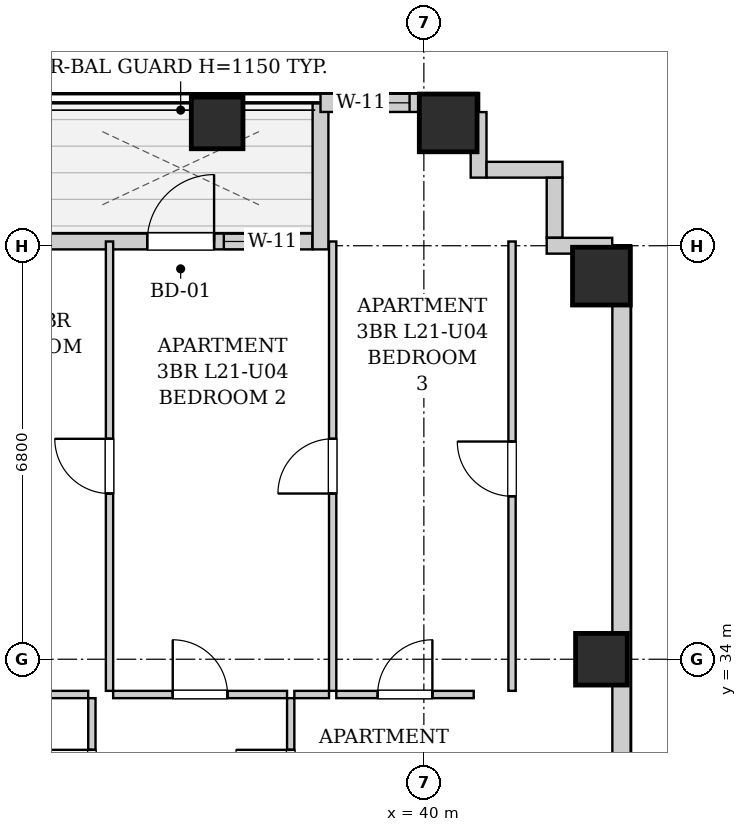
"""IFC4 building model, lengths in metres.
Left out: names, types, materials, properties, quantities, classifications, styles, units other than length and angle.
Written with IfcOpenShell. Run it as: python <this file> out.ifc"""

import sys

from ifc_helpers import new_model, si_unit, direction, frame, frame_2d, origin, origin_2d, place, context, subcontext, project, spatial, rectangle, extrude, element, fill, save


model = new_model("IFC4")
c1 = context("Model", 3, precision=1e-05, world=origin(), true_north=direction((0.0, 1.0)))
c2 = subcontext(c1, "Body", "Model", "MODEL_VIEW")
j1 = project(units=[si_unit("LENGTHUNIT", "METRE"), si_unit("PLANEANGLEUNIT", "RADIAN")], contexts=[c1])
p1 = place(None, origin())
s1 = spatial("IfcSite", under=j1, at=p1, CompositionType="ELEMENT")
p2 = place(p1, origin())
s2 = spatial("IfcBuilding", under=s1, at=p2, CompositionType="ELEMENT")
p3 = place(p2, frame((0.0, 0.0, 78.3)))
s3 = spatial("IfcBuildingStorey", under=s2, at=p3, CompositionType="ELEMENT", Elevation=78.3)
p4 = place(p3, frame((36.6, 42.82, 0.0), z_axis=(0.0, 0.0, 1.0), x_axis=(1.0, 0.0, 0.0)))
e1 = element("IfcColumn", 1, at=p4, inside=s3, PredefinedType="COLUMN", context=c2, shape_type="SweptSolid", body=[
    extrude(rectangle(XDim=0.85, YDim=0.85, at=origin_2d()), origin(), (0.0, 0.0, 1.0), 3.2),
])
p5 = place(p3, frame((40.4, 42.82, 0.0), z_axis=(0.0, 0.0, 1.0), x_axis=(1.0, 0.0, 0.0)))
e2 = element("IfcColumn", 2, at=p5, inside=s3, PredefinedType="COLUMN", context=c2, shape_type="SweptSolid", body=[
    extrude(rectangle(XDim=0.95, YDim=0.95, at=origin_2d()), origin(), (0.0, 0.0, 1.0), 3.2),
])
p6 = place(p3, frame((42.92, 34.0, 0.0), z_axis=(0.0, 0.0, 1.0), x_axis=(1.0, 0.0, 0.0)))
e3 = element("IfcColumn", 3, at=p6, inside=s3, PredefinedType="COLUMN", context=c2, shape_type="SweptSolid", body=[
    extrude(rectangle(XDim=0.85, YDim=0.85, at=origin_2d()), origin(), (0.0, 0.0, 1.0), 3.2),
])
p7 = place(p3, frame((42.92, 40.3, 0.0), z_axis=(0.0, 0.0, 1.0), x_axis=(1.0, 0.0, 0.0)))
e4 = element("IfcColumn", 4, at=p7, inside=s3, PredefinedType="COLUMN", context=c2, shape_type="SweptSolid", body=[
    extrude(rectangle(XDim=0.95, YDim=0.95, at=origin_2d()), origin(), (0.0, 0.0, 1.0), 3.2),
])
p8 = place(p3, frame((33.834, 40.87, 0.0), z_axis=(0.0, 0.0, 1.0), x_axis=(1.0, 0.0, 0.0)))
e5 = element("IfcWall", 5, at=p8, inside=s3, PredefinedType="SOLIDWALL", context=c2, shape_type="SweptSolid", body=[
    extrude(rectangle(XDim=4.332, YDim=0.26, at=frame_2d((2.166, 0.0))), origin(), (0.0, 0.0, 1.0), 2.94),
])
p9 = place(p8, frame((1.616, 0.0, 0.0)))
e6 = element("IfcOpeningElement", 6, at=p9, cuts=e5, PredefinedType="OPENING", context=c2, shape_type="SweptSolid", body=[
    extrude(rectangle(XDim=1.1, YDim=2.0, at=frame_2d((0.55, 1.0))), frame((0.0, 0.14, 0.0), z_axis=(0.0, -1.0, 0.0), x_axis=(1.0, 0.0, 0.0)), (0.0, 0.0, 1.0), 0.28),
])
p10 = place(p8, frame((2.876, 0.0, 0.55)))
e7 = element("IfcOpeningElement", 7, at=p10, cuts=e5, PredefinedType="OPENING", context=c2, shape_type="SweptSolid", body=[
    extrude(rectangle(XDim=0.85, YDim=1.2, at=frame_2d((0.425, 0.6))), frame((0.0, 0.14, 0.0), z_axis=(0.0, -1.0, 0.0), x_axis=(1.0, 0.0, 0.0)), (0.0, 0.0, 1.0), 0.28),
])
p11 = place(p3, frame((38.3, 40.74, 0.0), z_axis=(0.0, 0.0, 1.0), x_axis=(0.0, 1.0, 0.0)))
e8 = element("IfcWall", 8, at=p11, inside=s3, PredefinedType="SOLIDWALL", context=c2, shape_type="SweptSolid", body=[
    extrude(rectangle(XDim=2.4, YDim=0.26, at=frame_2d((1.2, 0.0))), origin(), (0.0, 0.0, 1.0), 2.94),
])
p12 = place(p3, frame((38.3, 43.15, 0.0), z_axis=(0.0, 0.0, 1.0), x_axis=(1.0, 0.0, 0.0)))
e9 = element("IfcWall", 9, at=p12, inside=s3, PredefinedType="SOLIDWALL", context=c2, shape_type="SweptSolid", body=[
    extrude(rectangle(XDim=2.6, YDim=0.3, at=frame_2d((1.3, 0.0))), origin(), (0.0, 0.0, 1.0), 2.94),
])
p13 = place(p12, frame((0.615, 0.0, 0.55)))
e10 = element("IfcOpeningElement", 10, at=p13, cuts=e9, PredefinedType="OPENING", context=c2, shape_type="SweptSolid", body=[
    extrude(rectangle(XDim=0.85, YDim=1.2, at=frame_2d((0.425, 0.6))), frame((0.0, 0.16, 0.0), z_axis=(0.0, -1.0, 0.0), x_axis=(1.0, 0.0, 0.0)), (0.0, 0.0, 1.0), 0.32),
])
p14 = place(p3, frame((43.25, 40.8, 0.0), z_axis=(0.0, 0.0, 1.0), x_axis=(0.0, -1.0, 0.0)))
e11 = element("IfcWall", 11, at=p14, inside=s3, PredefinedType="SOLIDWALL", context=c2, shape_type="SweptSolid", body=[
    extrude(rectangle(XDim=38.3, YDim=0.3, at=frame_2d((19.15, 0.0))), origin(), (0.0, 0.0, 1.0), 2.94),
])
p15 = place(p14, frame((33.495, 0.0, 0.55)))
e12 = element("IfcOpeningElement", 12, at=p15, cuts=e11, PredefinedType="OPENING", context=c2, shape_type="SweptSolid", body=[
    extrude(rectangle(XDim=1.35, YDim=1.2, at=frame_2d((0.675, 0.6))), frame((0.0, 0.16, 0.0), z_axis=(0.0, -1.0, 0.0), x_axis=(1.0, 0.0, 0.0)), (0.0, 0.0, 1.0), 0.32),
])
p16 = place(p14, frame((31.785, 0.0, 0.55)))
e13 = element("IfcOpeningElement", 13, at=p16, cuts=e11, PredefinedType="OPENING", context=c2, shape_type="SweptSolid", body=[
    extrude(rectangle(XDim=1.35, YDim=1.2, at=frame_2d((0.675, 0.6))), frame((0.0, 0.16, 0.0), z_axis=(0.0, -1.0, 0.0), x_axis=(1.0, 0.0, 0.0)), (0.0, 0.0, 1.0), 0.32),
])
p17 = place(p14, frame((21.93, 0.0, 0.55)))
e14 = element("IfcOpeningElement", 14, at=p17, cuts=e11, PredefinedType="OPENING", context=c2, shape_type="SweptSolid", body=[
    extrude(rectangle(XDim=1.35, YDim=1.2, at=frame_2d((0.675, 0.6))), frame((0.0, 0.16, 0.0), z_axis=(0.0, -1.0, 0.0), x_axis=(1.0, 0.0, 0.0)), (0.0, 0.0, 1.0), 0.32),
])
p18 = place(p14, frame((23.54, 0.0, 0.55)))
e15 = element("IfcOpeningElement", 15, at=p18, cuts=e11, PredefinedType="OPENING", context=c2, shape_type="SweptSolid", body=[
    extrude(rectangle(XDim=1.35, YDim=1.2, at=frame_2d((0.675, 0.6))), frame((0.0, 0.16, 0.0), z_axis=(0.0, -1.0, 0.0), x_axis=(1.0, 0.0, 0.0)), (0.0, 0.0, 1.0), 0.32),
])
p19 = place(p14, frame((14.95, 0.0, 0.55)))
e16 = element("IfcOpeningElement", 16, at=p19, cuts=e11, PredefinedType="OPENING", context=c2, shape_type="SweptSolid", body=[
    extrude(rectangle(XDim=1.35, YDim=1.2, at=frame_2d((0.675, 0.6))), frame((0.0, 0.16, 0.0), z_axis=(0.0, -1.0, 0.0), x_axis=(1.0, 0.0, 0.0)), (0.0, 0.0, 1.0), 0.32),
])
p20 = place(p14, frame((12.385, 0.0, 0.55)))
e17 = element("IfcOpeningElement", 17, at=p20, cuts=e11, PredefinedType="OPENING", context=c2, shape_type="SweptSolid", body=[
    extrude(rectangle(XDim=1.35, YDim=1.2, at=frame_2d((0.675, 0.6))), frame((0.0, 0.16, 0.0), z_axis=(0.0, -1.0, 0.0), x_axis=(1.0, 0.0, 0.0)), (0.0, 0.0, 1.0), 0.32),
])
p21 = place(p3, frame((40.9, 42.998, 0.0), z_axis=(0.0, 0.0, 1.0), x_axis=(0.0, -1.0, 0.0)))
e18 = element("IfcWall", 18, at=p21, inside=s3, PredefinedType="SOLIDWALL", context=c2, shape_type="SweptSolid", body=[
    extrude(rectangle(XDim=1.078, YDim=0.26, at=frame_2d((0.539, 0.0))), origin(), (0.0, 0.0, 1.0), 2.94),
])
p22 = place(p3, frame((41.032, 42.05, 0.0), z_axis=(0.0, 0.0, 1.0), x_axis=(1.0, 0.0, 0.0)))
e19 = element("IfcWall", 19, at=p22, inside=s3, PredefinedType="SOLIDWALL", context=c2, shape_type="SweptSolid", body=[
    extrude(rectangle(XDim=1.248, YDim=0.26, at=frame_2d((0.624, 0.0))), origin(), (0.0, 0.0, 1.0), 2.94),
])
p23 = place(p3, frame((42.15, 41.918, 0.0), z_axis=(0.0, 0.0, 1.0), x_axis=(0.0, -1.0, 0.0)))
e20 = element("IfcWall", 20, at=p23, inside=s3, PredefinedType="SOLIDWALL", context=c2, shape_type="SweptSolid", body=[
    extrude(rectangle(XDim=0.986, YDim=0.26, at=frame_2d((0.493, 0.0))), origin(), (0.0, 0.0, 1.0), 2.94),
])
p24 = place(p3, frame((42.02, 40.8, 0.0), z_axis=(0.0, 0.0, 1.0), x_axis=(1.0, 0.0, 0.0)))
e21 = element("IfcWall", 21, at=p24, inside=s3, PredefinedType="SOLIDWALL", context=c2, shape_type="SweptSolid", body=[
    extrude(rectangle(XDim=1.078, YDim=0.26, at=frame_2d((0.539, 0.0))), origin(), (0.0, 0.0, 1.0), 2.94),
])
p25 = place(p3, frame((34.54, 30.76, 0.0), z_axis=(0.0, 0.0, 1.0), x_axis=(0.0, 1.0, 0.0)))
e22 = element("IfcWall", 22, at=p25, inside=s3, PredefinedType="PARTITIONING", context=c2, shape_type="SweptSolid", body=[
    extrude(rectangle(XDim=2.6, YDim=0.12, at=frame_2d((1.3, 0.0))), origin(), (0.0, 0.0, 1.0), 2.94),
])
p26 = place(p25, frame((0.85, 0.0, 0.0)))
e23 = element("IfcOpeningElement", 23, at=p26, cuts=e22, PredefinedType="OPENING", context=c2, shape_type="SweptSolid", body=[
    extrude(rectangle(XDim=0.9, YDim=2.05, at=frame_2d((0.45, 1.025))), frame((0.0, 0.07, 0.0), z_axis=(0.0, -1.0, 0.0), x_axis=(1.0, 0.0, 0.0)), (0.0, 0.0, 1.0), 0.14),
])
p27 = place(p3, frame((30.88, 33.42, 0.0), z_axis=(0.0, 0.0, 1.0), x_axis=(1.0, 0.0, 0.0)))
e24 = element("IfcWall", 24, at=p27, inside=s3, PredefinedType="PARTITIONING", context=c2, shape_type="SweptSolid", body=[
    extrude(rectangle(XDim=3.6, YDim=0.12, at=frame_2d((1.8, 0.0))), origin(), (0.0, 0.0, 1.0), 2.94),
])
p28 = place(p27, frame((1.35, 0.0, 0.0)))
e25 = element("IfcOpeningElement", 25, at=p28, cuts=e24, PredefinedType="OPENING", context=c2, shape_type="SweptSolid", body=[
    extrude(rectangle(XDim=0.9, YDim=2.05, at=frame_2d((0.45, 1.025))), frame((0.0, 0.07, 0.0), z_axis=(0.0, -1.0, 0.0), x_axis=(1.0, 0.0, 0.0)), (0.0, 0.0, 1.0), 0.14),
])
p29 = place(p3, frame((37.81, 30.76, 0.0), z_axis=(0.0, 0.0, 1.0), x_axis=(0.0, 1.0, 0.0)))
e26 = element("IfcWall", 26, at=p29, inside=s3, PredefinedType="PARTITIONING", context=c2, shape_type="SweptSolid", body=[
    extrude(rectangle(XDim=2.6, YDim=0.12, at=frame_2d((1.3, 0.0))), origin(), (0.0, 0.0, 1.0), 2.94),
])
p30 = place(p29, frame((0.85, 0.0, 0.0)))
e27 = element("IfcOpeningElement", 27, at=p30, cuts=e26, PredefinedType="OPENING", context=c2, shape_type="SweptSolid", body=[
    extrude(rectangle(XDim=0.9, YDim=2.05, at=frame_2d((0.45, 1.025))), frame((0.0, 0.07, 0.0), z_axis=(0.0, -1.0, 0.0), x_axis=(1.0, 0.0, 0.0)), (0.0, 0.0, 1.0), 0.14),
])
p31 = place(p3, frame((34.89, 33.42, 0.0), z_axis=(0.0, 0.0, 1.0), x_axis=(1.0, 0.0, 0.0)))
e28 = element("IfcWall", 28, at=p31, inside=s3, PredefinedType="PARTITIONING", context=c2, shape_type="SweptSolid", body=[
    extrude(rectangle(XDim=2.86, YDim=0.12, at=frame_2d((1.43, 0.0))), origin(), (0.0, 0.0, 1.0), 2.94),
])
p32 = place(p31, frame((0.98, 0.0, 0.0)))
e29 = element("IfcOpeningElement", 29, at=p32, cuts=e28, PredefinedType="OPENING", context=c2, shape_type="SweptSolid", body=[
    extrude(rectangle(XDim=0.9, YDim=2.05, at=frame_2d((0.45, 1.025))), frame((0.0, 0.07, 0.0), z_axis=(0.0, -1.0, 0.0), x_axis=(1.0, 0.0, 0.0)), (0.0, 0.0, 1.0), 0.14),
])
p33 = place(p3, frame((37.87, 33.42, 0.0), z_axis=(0.0, 0.0, 1.0), x_axis=(1.0, 0.0, 0.0)))
e30 = element("IfcWall", 30, at=p33, inside=s3, PredefinedType="PARTITIONING", context=c2, shape_type="SweptSolid", body=[
    extrude(rectangle(XDim=0.57, YDim=0.12, at=frame_2d((0.285, 0.0))), origin(), (0.0, 0.0, 1.0), 2.94),
])
p34 = place(p3, frame((38.56, 33.42, 0.0), z_axis=(0.0, 0.0, 1.0), x_axis=(1.0, 0.0, 0.0)))
e31 = element("IfcWall", 31, at=p34, inside=s3, PredefinedType="PARTITIONING", context=c2, shape_type="SweptSolid", body=[
    extrude(rectangle(XDim=2.26, YDim=0.12, at=frame_2d((1.13, 0.0))), origin(), (0.0, 0.0, 1.0), 2.94),
])
p35 = place(p34, frame((0.68, 0.0, 0.0)))
e32 = element("IfcOpeningElement", 32, at=p35, cuts=e31, PredefinedType="OPENING", context=c2, shape_type="SweptSolid", body=[
    extrude(rectangle(XDim=0.9, YDim=2.05, at=frame_2d((0.45, 1.025))), frame((0.0, 0.07, 0.0), z_axis=(0.0, -1.0, 0.0), x_axis=(1.0, 0.0, 0.0)), (0.0, 0.0, 1.0), 0.14),
])
p36 = place(p3, frame((34.83, 33.48, 0.0), z_axis=(0.0, 0.0, 1.0), x_axis=(0.0, 1.0, 0.0)))
e33 = element("IfcWall", 33, at=p36, inside=s3, PredefinedType="PARTITIONING", context=c2, shape_type="SweptSolid", body=[
    extrude(rectangle(XDim=7.39, YDim=0.12, at=frame_2d((3.695, 0.0))), origin(), (0.0, 0.0, 1.0), 2.94),
])
p37 = place(p36, frame((3.245, 0.0, 0.0)))
e34 = element("IfcOpeningElement", 34, at=p37, cuts=e33, PredefinedType="OPENING", context=c2, shape_type="SweptSolid", body=[
    extrude(rectangle(XDim=0.9, YDim=2.05, at=frame_2d((0.45, 1.025))), frame((0.0, 0.07, 0.0), z_axis=(0.0, -1.0, 0.0), x_axis=(1.0, 0.0, 0.0)), (0.0, 0.0, 1.0), 0.14),
])
p38 = place(p3, frame((38.5, 33.48, 0.0), z_axis=(0.0, 0.0, 1.0), x_axis=(0.0, 1.0, 0.0)))
e35 = element("IfcWall", 35, at=p38, inside=s3, PredefinedType="PARTITIONING", context=c2, shape_type="SweptSolid", body=[
    extrude(rectangle(XDim=7.39, YDim=0.12, at=frame_2d((3.695, 0.0))), origin(), (0.0, 0.0, 1.0), 2.94),
])
p39 = place(p38, frame((3.245, 0.0, 0.0)))
e36 = element("IfcOpeningElement", 36, at=p39, cuts=e35, PredefinedType="OPENING", context=c2, shape_type="SweptSolid", body=[
    extrude(rectangle(XDim=0.9, YDim=2.05, at=frame_2d((0.45, 1.025))), frame((0.0, 0.07, 0.0), z_axis=(0.0, -1.0, 0.0), x_axis=(1.0, 0.0, 0.0)), (0.0, 0.0, 1.0), 0.14),
])
p40 = place(p3, frame((41.45, 33.48, 0.0), z_axis=(0.0, 0.0, 1.0), x_axis=(0.0, 1.0, 0.0)))
e37 = element("IfcWall", 37, at=p40, inside=s3, PredefinedType="PARTITIONING", context=c2, shape_type="SweptSolid", body=[
    extrude(rectangle(XDim=7.39, YDim=0.12, at=frame_2d((3.695, 0.0))), origin(), (0.0, 0.0, 1.0), 2.94),
])
p41 = place(p40, frame((3.2, 0.0, 0.0)))
e38 = element("IfcOpeningElement", 38, at=p41, cuts=e37, PredefinedType="OPENING", context=c2, shape_type="SweptSolid", body=[
    extrude(rectangle(XDim=0.9, YDim=2.05, at=frame_2d((0.45, 1.025))), frame((0.0, 0.07, 0.0), z_axis=(0.0, -1.0, 0.0), x_axis=(1.0, 0.0, 0.0)), (0.0, 0.0, 1.0), 0.14),
])
p42 = place(p26, origin())
e39 = element("IfcDoor", 39, at=p42, inside=s3, OperationType="SINGLE_SWING_RIGHT", PredefinedType="DOOR", context=c2, shape_type="SweptSolid", body=[
    extrude(rectangle(XDim=0.9, YDim=2.05, at=frame_2d((0.45, 1.025))), frame((0.0, 0.025, 0.0), z_axis=(0.0, -1.0, 0.0), x_axis=(1.0, 0.0, 0.0)), (0.0, 0.0, 1.0), 0.05),
])
fill(e23, e39)
p43 = place(p30, origin())
e40 = element("IfcDoor", 40, at=p43, inside=s3, OperationType="SINGLE_SWING_RIGHT", PredefinedType="DOOR", context=c2, shape_type="SweptSolid", body=[
    extrude(rectangle(XDim=0.9, YDim=2.05, at=frame_2d((0.45, 1.025))), frame((0.0, 0.025, 0.0), z_axis=(0.0, -1.0, 0.0), x_axis=(1.0, 0.0, 0.0)), (0.0, 0.0, 1.0), 0.05),
])
fill(e27, e40)
p44 = place(p32, origin())
e41 = element("IfcDoor", 41, at=p44, inside=s3, OperationType="SINGLE_SWING_LEFT", PredefinedType="DOOR", context=c2, shape_type="SweptSolid", body=[
    extrude(rectangle(XDim=0.9, YDim=2.05, at=frame_2d((0.45, 1.025))), frame((0.0, 0.025, 0.0), z_axis=(0.0, -1.0, 0.0), x_axis=(1.0, 0.0, 0.0)), (0.0, 0.0, 1.0), 0.05),
])
fill(e29, e41)
p45 = place(p35, origin())
e42 = element("IfcDoor", 42, at=p45, inside=s3, OperationType="SINGLE_SWING_RIGHT", PredefinedType="DOOR", context=c2, shape_type="SweptSolid", body=[
    extrude(rectangle(XDim=0.9, YDim=2.05, at=frame_2d((0.45, 1.025))), frame((0.0, 0.025, 0.0), z_axis=(0.0, -1.0, 0.0), x_axis=(1.0, 0.0, 0.0)), (0.0, 0.0, 1.0), 0.05),
])
fill(e32, e42)
p46 = place(p37, origin())
e43 = element("IfcDoor", 43, at=p46, inside=s3, OperationType="SINGLE_SWING_RIGHT", PredefinedType="DOOR", context=c2, shape_type="SweptSolid", body=[
    extrude(rectangle(XDim=0.9, YDim=2.05, at=frame_2d((0.45, 1.025))), frame((0.0, 0.025, 0.0), z_axis=(0.0, -1.0, 0.0), x_axis=(1.0, 0.0, 0.0)), (0.0, 0.0, 1.0), 0.05),
])
fill(e34, e43)
p47 = place(p39, origin())
e44 = element("IfcDoor", 44, at=p47, inside=s3, OperationType="SINGLE_SWING_LEFT", PredefinedType="DOOR", context=c2, shape_type="SweptSolid", body=[
    extrude(rectangle(XDim=0.9, YDim=2.05, at=frame_2d((0.45, 1.025))), frame((0.0, 0.025, 0.0), z_axis=(0.0, -1.0, 0.0), x_axis=(1.0, 0.0, 0.0)), (0.0, 0.0, 1.0), 0.05),
])
fill(e36, e44)
p48 = place(p41, origin())
e45 = element("IfcDoor", 45, at=p48, inside=s3, OperationType="SINGLE_SWING_RIGHT", PredefinedType="DOOR", context=c2, shape_type="SweptSolid", body=[
    extrude(rectangle(XDim=0.9, YDim=2.05, at=frame_2d((0.45, 1.025))), frame((0.0, 0.025, 0.0), z_axis=(0.0, -1.0, 0.0), x_axis=(1.0, 0.0, 0.0)), (0.0, 0.0, 1.0), 0.05),
])
fill(e38, e45)
p49 = place(p9, origin())
e46 = element("IfcDoor", 46, at=p49, inside=s3, OperationType="SINGLE_SWING_RIGHT", PredefinedType="DOOR", context=c2, shape_type="SweptSolid", body=[
    extrude(rectangle(XDim=1.1, YDim=2.0, at=frame_2d((0.55, 1.0))), frame((0.0, 0.025, 0.0), z_axis=(0.0, -1.0, 0.0), x_axis=(1.0, 0.0, 0.0)), (0.0, 0.0, 1.0), 0.05),
])
fill(e6, e46)
p50 = place(p10, origin())
e47 = element("IfcWindow", 47, at=p50, inside=s3, PartitioningType="SINGLE_PANEL", PredefinedType="WINDOW", context=c2, shape_type="SweptSolid", body=[
    extrude(rectangle(XDim=0.85, YDim=1.2, at=frame_2d((0.425, 0.6))), frame((0.0, 0.03, 0.0), z_axis=(0.0, -1.0, 0.0), x_axis=(1.0, 0.0, 0.0)), (0.0, 0.0, 1.0), 0.06),
])
fill(e7, e47)
p51 = place(p13, origin())
e48 = element("IfcWindow", 48, at=p51, inside=s3, PartitioningType="SINGLE_PANEL", PredefinedType="WINDOW", context=c2, shape_type="SweptSolid", body=[
    extrude(rectangle(XDim=0.85, YDim=1.2, at=frame_2d((0.425, 0.6))), frame((0.0, 0.03, 0.0), z_axis=(0.0, -1.0, 0.0), x_axis=(1.0, 0.0, 0.0)), (0.0, 0.0, 1.0), 0.06),
])
fill(e10, e48)
save(model, sys.argv[1])
